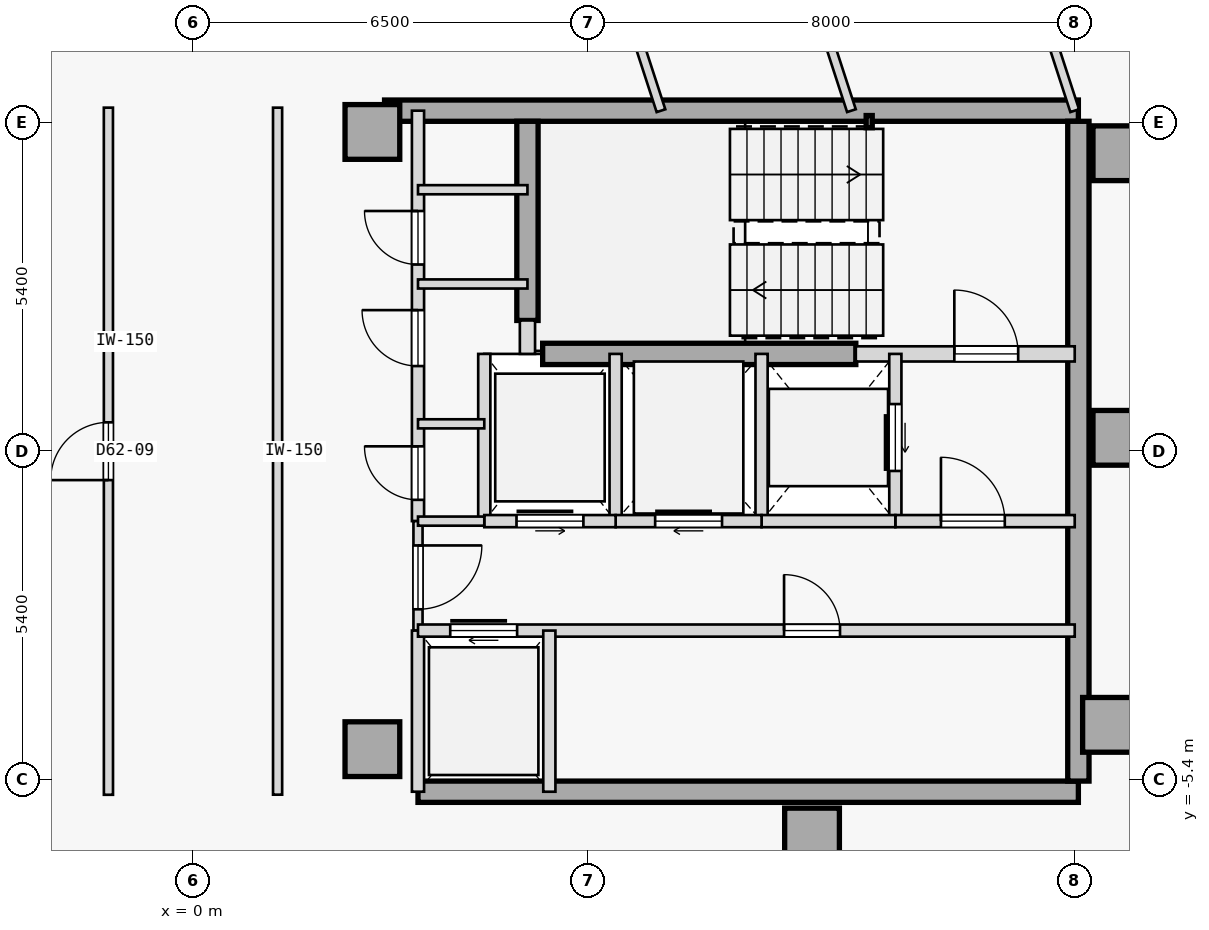
"""IFC4 building model, lengths in metres.
Left out: names, types, materials, properties, quantities, classifications, styles, units other than length and angle.
Written with IfcOpenShell. Run it as: python <this file> out.ifc"""

import sys

from ifc_helpers import new_model, si_unit, direction, frame, frame_2d, origin, origin_2d, place, context, subcontext, project, spatial, rectangle, hollow_rectangle, extrude, element, fill, save


model = new_model("IFC4")
c1 = context("Model", 3, precision=1e-05, world=origin(), true_north=direction((0.0, 1.0)))
c2 = subcontext(c1, "Body", "Model", "MODEL_VIEW")
j1 = project(units=[si_unit("LENGTHUNIT", "METRE"), si_unit("PLANEANGLEUNIT", "RADIAN")], contexts=[c1])
p1 = place(None, origin())
s1 = spatial("IfcSite", under=j1, at=p1, CompositionType="ELEMENT")
p2 = place(p1, origin())
s2 = spatial("IfcBuilding", under=s1, at=p2, CompositionType="ELEMENT")
p3 = place(p2, frame((0.0, 0.0, 234.35)))
s3 = spatial("IfcBuildingStorey", under=s2, at=p3, CompositionType="ELEMENT", Elevation=234.35)
for number, where, z_axis, x_axis in (
    (1, (15.25, 4.9, 0.0), (0.0, 0.0, 1.0), (1.0, 0.0, 0.0)),
    (2, (15.25, 0.22, 0.0), (0.0, 0.0, 1.0), (1.0, 0.0, 0.0)),
    (3, (15.08, -4.5, 0.0), (0.0, 0.0, 1.0), (1.0, 0.0, 0.0)),
    (4, (10.18, -6.32, 0.0), (0.0, 0.0, 1.0), (1.0, 0.0, 0.0)),
    (5, (2.95, -4.9, 0.0), (0.0, 0.0, 1.0), (1.0, 0.0, 0.0)),
    (6, (2.95, 5.25, 0.0), (0.0, 0.0, 1.0), (1.0, 0.0, 0.0)),
):
    element("IfcColumn", number, at=place(p3, frame(where, z_axis=z_axis, x_axis=x_axis)), inside=s3, PredefinedType="COLUMN", context=c2, shape_type="SweptSolid", body=[
        extrude(rectangle(XDim=0.9, YDim=0.9, at=origin_2d()), origin(), (0.0, 0.0, 1.0), 3.35),
    ])
p4 = place(p3, frame((3.15, 5.6, 0.0), z_axis=(0.0, 0.0, 1.0), x_axis=(1.0, 0.0, 0.0)))
e7 = element("IfcWall", 7, at=p4, inside=s3, PredefinedType="SHEAR", context=c2, shape_type="SweptSolid", body=[
    extrude(rectangle(XDim=11.41, YDim=0.35, at=frame_2d((5.705, 0.0))), origin(), (0.0, 0.0, 1.0), 3.125),
])
p5 = place(p3, frame((3.7, -5.6, 0.0), z_axis=(0.0, 0.0, 1.0), x_axis=(1.0, 0.0, 0.0)))
e8 = element("IfcWall", 8, at=p5, inside=s3, PredefinedType="SHEAR", context=c2, shape_type="SweptSolid", body=[
    extrude(rectangle(XDim=10.86, YDim=0.35, at=frame_2d((5.43, 0.0))), origin(), (0.0, 0.0, 1.0), 3.125),
])
p6 = place(p3, frame((14.56, -5.425, 0.0), z_axis=(0.0, 0.0, 1.0), x_axis=(0.0, 1.0, 0.0)))
e9 = element("IfcWall", 9, at=p6, inside=s3, PredefinedType="SHEAR", context=c2, shape_type="SweptSolid", body=[
    extrude(rectangle(XDim=10.85, YDim=0.35, at=frame_2d((5.425, 0.0))), origin(), (0.0, 0.0, 1.0), 3.125),
])
p7 = place(p3, frame((5.5, 2.15, 0.0), z_axis=(0.0, 0.0, 1.0), x_axis=(0.0, 1.0, 0.0)))
e10 = element("IfcWall", 10, at=p7, inside=s3, PredefinedType="SHEAR", context=c2, shape_type="SweptSolid", body=[
    extrude(rectangle(XDim=3.275, YDim=0.35, at=frame_2d((1.638, 0.0))), origin(), (0.0, 0.0, 1.0), 3.125),
])
p8 = place(p3, frame((5.75, 1.6, 0.0), z_axis=(0.0, 0.0, 1.0), x_axis=(1.0, 0.0, 0.0)))
e11 = element("IfcWall", 11, at=p8, inside=s3, PredefinedType="SHEAR", context=c2, shape_type="SweptSolid", body=[
    extrude(rectangle(XDim=5.15, YDim=0.35, at=frame_2d((2.575, 0.0))), origin(), (0.0, 0.0, 1.0), 3.125),
])
p9 = place(p3, frame((11.12, 5.42, 0.0), z_axis=(0.0, 0.0, 1.0), x_axis=(1.0, 0.0, 0.0)))
e12 = element("IfcColumn", 12, at=p9, inside=s3, PredefinedType="COLUMN", context=c2, shape_type="SweptSolid", body=[
    extrude(hollow_rectangle(XDim=0.1, YDim=0.2, WallThickness=0.008, at=origin_2d()), origin(), (0.0, 0.0, 1.0), 3.35),
])
p10 = place(p3, frame((10.9, 1.6, 0.0), z_axis=(0.0, 0.0, 1.0), x_axis=(1.0, 0.0, 0.0)))
e13 = element("IfcWall", 13, at=p10, inside=s3, PredefinedType="STANDARD", context=c2, shape_type="SweptSolid", body=[
    extrude(rectangle(XDim=3.6, YDim=0.25, at=frame_2d((1.8, 0.0))), origin(), (0.0, 0.0, 1.0), 3.125),
])
p11 = place(p10, frame((1.62, 0.0, 0.0)))
e14 = element("IfcOpeningElement", 14, at=p11, cuts=e13, PredefinedType="OPENING", context=c2, shape_type="SweptSolid", body=[
    extrude(rectangle(XDim=1.05, YDim=2.15, at=frame_2d((0.525, 1.075))), frame((0.0, 0.135, 0.0), z_axis=(0.0, -1.0, 0.0), x_axis=(1.0, 0.0, 0.0)), (0.0, 0.0, 1.0), 0.27),
])
p12 = place(p3, frame((5.5, 1.6, 0.0), z_axis=(0.0, 0.0, 1.0), x_axis=(0.0, 1.0, 0.0)))
e15 = element("IfcWall", 15, at=p12, inside=s3, PredefinedType="STANDARD", context=c2, shape_type="SweptSolid", body=[
    extrude(rectangle(XDim=0.55, YDim=0.25, at=frame_2d((0.275, 0.0))), origin(), (0.0, 0.0, 1.0), 3.125),
])
p13 = place(p3, frame((3.7, -1.15, 0.0), z_axis=(0.0, 0.0, 1.0), x_axis=(0.0, 1.0, 0.0)))
e16 = element("IfcWall", 16, at=p13, inside=s3, PredefinedType="STANDARD", context=c2, shape_type="SweptSolid", body=[
    extrude(rectangle(XDim=6.75, YDim=0.2, at=frame_2d((3.375, 0.0))), origin(), (0.0, 0.0, 1.0), 3.125),
])
p14 = place(p13, frame((0.35, 0.0, 0.0)))
e17 = element("IfcOpeningElement", 17, at=p14, cuts=e16, PredefinedType="OPENING", context=c2, shape_type="SweptSolid", body=[
    extrude(rectangle(XDim=0.88, YDim=2.15, at=frame_2d((0.44, 1.075))), frame((0.0, 0.11, 0.0), z_axis=(0.0, -1.0, 0.0), x_axis=(1.0, 0.0, 0.0)), (0.0, 0.0, 1.0), 0.22),
])
p15 = place(p13, frame((2.55, 0.0, 0.0)))
e18 = element("IfcOpeningElement", 18, at=p15, cuts=e16, PredefinedType="OPENING", context=c2, shape_type="SweptSolid", body=[
    extrude(rectangle(XDim=0.92, YDim=2.15, at=frame_2d((0.46, 1.075))), frame((0.0, 0.11, 0.0), z_axis=(0.0, -1.0, 0.0), x_axis=(1.0, 0.0, 0.0)), (0.0, 0.0, 1.0), 0.22),
])
p16 = place(p13, frame((4.22, 0.0, 0.0)))
e19 = element("IfcOpeningElement", 19, at=p16, cuts=e16, PredefinedType="OPENING", context=c2, shape_type="SweptSolid", body=[
    extrude(rectangle(XDim=0.88, YDim=2.15, at=frame_2d((0.44, 1.075))), frame((0.0, 0.11, 0.0), z_axis=(0.0, -1.0, 0.0), x_axis=(1.0, 0.0, 0.0)), (0.0, 0.0, 1.0), 0.22),
])
p17 = place(p3, frame((3.7, -2.95, 0.0), z_axis=(0.0, 0.0, 1.0), x_axis=(0.0, 1.0, 0.0)))
e20 = element("IfcWall", 20, at=p17, inside=s3, PredefinedType="PARTITIONING", context=c2, shape_type="SweptSolid", body=[
    extrude(rectangle(XDim=1.8, YDim=0.15, at=frame_2d((0.9, 0.0))), origin(), (0.0, 0.0, 1.0), 3.125),
])
p18 = place(p17, frame((0.35, 0.0, 0.0)))
e21 = element("IfcOpeningElement", 21, at=p18, cuts=e20, PredefinedType="OPENING", context=c2, shape_type="SweptSolid", body=[
    extrude(rectangle(XDim=1.05, YDim=2.18, at=frame_2d((0.525, 1.09))), frame((0.0, 0.085, 0.0), z_axis=(0.0, -1.0, 0.0), x_axis=(1.0, 0.0, 0.0)), (0.0, 0.0, 1.0), 0.17),
])
p19 = place(p3, frame((3.7, -5.6, 0.0), z_axis=(0.0, 0.0, 1.0), x_axis=(0.0, 1.0, 0.0)))
e22 = element("IfcWall", 22, at=p19, inside=s3, PredefinedType="STANDARD", context=c2, shape_type="SweptSolid", body=[
    extrude(rectangle(XDim=2.65, YDim=0.2, at=frame_2d((1.325, 0.0))), origin(), (0.0, 0.0, 1.0), 3.125),
])
p20 = place(p3, frame((11.55, -1.15, 0.0), z_axis=(0.0, 0.0, 1.0), x_axis=(0.0, 1.0, 0.0)))
e23 = element("IfcWall", 23, at=p20, inside=s3, PredefinedType="STANDARD", context=c2, shape_type="SweptSolid", body=[
    extrude(rectangle(XDim=2.75, YDim=0.2, at=frame_2d((1.375, 0.0))), origin(), (0.0, 0.0, 1.0), 3.125),
])
p21 = place(p20, frame((0.825, 0.0, 0.0)))
e24 = element("IfcOpeningElement", 24, at=p21, cuts=e23, PredefinedType="OPENING", context=c2, shape_type="SweptSolid", body=[
    extrude(rectangle(XDim=1.1, YDim=2.15, at=frame_2d((0.55, 1.075))), frame((0.0, 0.11, 0.0), z_axis=(0.0, -1.0, 0.0), x_axis=(1.0, 0.0, 0.0)), (0.0, 0.0, 1.0), 0.22),
])
p22 = place(p3, frame((9.35, -1.15, 0.0), z_axis=(0.0, 0.0, 1.0), x_axis=(0.0, 1.0, 0.0)))
e25 = element("IfcWall", 25, at=p22, inside=s3, PredefinedType="STANDARD", context=c2, shape_type="SweptSolid", body=[
    extrude(rectangle(XDim=2.75, YDim=0.2, at=frame_2d((1.375, 0.0))), origin(), (0.0, 0.0, 1.0), 3.125),
])
p23 = place(p3, frame((11.55, -1.15, 0.0), z_axis=(0.0, 0.0, 1.0), x_axis=(1.0, 0.0, 0.0)))
e26 = element("IfcWall", 26, at=p23, inside=s3, PredefinedType="STANDARD", context=c2, shape_type="SweptSolid", body=[
    extrude(rectangle(XDim=2.95, YDim=0.2, at=frame_2d((1.475, 0.0))), origin(), (0.0, 0.0, 1.0), 3.125),
])
p24 = place(p23, frame((0.75, 0.0, 0.0)))
e27 = element("IfcOpeningElement", 27, at=p24, cuts=e26, PredefinedType="OPENING", context=c2, shape_type="SweptSolid", body=[
    extrude(rectangle(XDim=1.05, YDim=2.18, at=frame_2d((0.525, 1.09))), frame((0.0, 0.11, 0.0), z_axis=(0.0, -1.0, 0.0), x_axis=(1.0, 0.0, 0.0)), (0.0, 0.0, 1.0), 0.22),
])
p25 = place(p3, frame((9.35, -1.15, 0.0), z_axis=(0.0, 0.0, 1.0), x_axis=(1.0, 0.0, 0.0)))
e28 = element("IfcWall", 28, at=p25, inside=s3, PredefinedType="STANDARD", context=c2, shape_type="SweptSolid", body=[
    extrude(rectangle(XDim=2.2, YDim=0.2, at=frame_2d((1.1, 0.0))), origin(), (0.0, 0.0, 1.0), 3.125),
])
p26 = place(p3, frame((6.95, -1.15, 0.0), z_axis=(0.0, 0.0, 1.0), x_axis=(0.0, 1.0, 0.0)))
e29 = element("IfcWall", 29, at=p26, inside=s3, PredefinedType="STANDARD", context=c2, shape_type="SweptSolid", body=[
    extrude(rectangle(XDim=2.75, YDim=0.2, at=frame_2d((1.375, 0.0))), origin(), (0.0, 0.0, 1.0), 3.125),
])
p27 = place(p3, frame((6.95, -1.15, 0.0), z_axis=(0.0, 0.0, 1.0), x_axis=(1.0, 0.0, 0.0)))
e30 = element("IfcWall", 30, at=p27, inside=s3, PredefinedType="STANDARD", context=c2, shape_type="SweptSolid", body=[
    extrude(rectangle(XDim=2.4, YDim=0.2, at=frame_2d((1.2, 0.0))), origin(), (0.0, 0.0, 1.0), 3.125),
])
p28 = place(p27, frame((0.65, 0.0, 0.0)))
e31 = element("IfcOpeningElement", 31, at=p28, cuts=e30, PredefinedType="OPENING", context=c2, shape_type="SweptSolid", body=[
    extrude(rectangle(XDim=1.1, YDim=2.15, at=frame_2d((0.55, 1.075))), frame((0.0, 0.11, 0.0), z_axis=(0.0, -1.0, 0.0), x_axis=(1.0, 0.0, 0.0)), (0.0, 0.0, 1.0), 0.22),
])
p29 = place(p3, frame((4.79, -1.15, 0.0), z_axis=(0.0, 0.0, 1.0), x_axis=(0.0, 1.0, 0.0)))
e32 = element("IfcWall", 32, at=p29, inside=s3, PredefinedType="STANDARD", context=c2, shape_type="SweptSolid", body=[
    extrude(rectangle(XDim=2.75, YDim=0.2, at=frame_2d((1.375, 0.0))), origin(), (0.0, 0.0, 1.0), 3.125),
])
p30 = place(p3, frame((4.79, -1.15, 0.0), z_axis=(0.0, 0.0, 1.0), x_axis=(1.0, 0.0, 0.0)))
e33 = element("IfcWall", 33, at=p30, inside=s3, PredefinedType="STANDARD", context=c2, shape_type="SweptSolid", body=[
    extrude(rectangle(XDim=2.16, YDim=0.2, at=frame_2d((1.08, 0.0))), origin(), (0.0, 0.0, 1.0), 3.125),
])
p31 = place(p30, frame((0.53, 0.0, 0.0)))
e34 = element("IfcOpeningElement", 34, at=p31, cuts=e33, PredefinedType="OPENING", context=c2, shape_type="SweptSolid", body=[
    extrude(rectangle(XDim=1.1, YDim=2.15, at=frame_2d((0.55, 1.075))), frame((0.0, 0.11, 0.0), z_axis=(0.0, -1.0, 0.0), x_axis=(1.0, 0.0, 0.0)), (0.0, 0.0, 1.0), 0.22),
])
p32 = place(p3, frame((3.7, -1.15, 0.0), z_axis=(0.0, 0.0, 1.0), x_axis=(1.0, 0.0, 0.0)))
e35 = element("IfcWall", 35, at=p32, inside=s3, PredefinedType="PARTITIONING", context=c2, shape_type="SweptSolid", body=[
    extrude(rectangle(XDim=1.09, YDim=0.15, at=frame_2d((0.545, 0.0))), origin(), (0.0, 0.0, 1.0), 3.125),
])
p33 = place(p3, frame((3.7, -2.95, 0.0), z_axis=(0.0, 0.0, 1.0), x_axis=(1.0, 0.0, 0.0)))
e36 = element("IfcWall", 36, at=p33, inside=s3, PredefinedType="STANDARD", context=c2, shape_type="SweptSolid", body=[
    extrude(rectangle(XDim=10.8, YDim=0.2, at=frame_2d((5.4, 0.0))), origin(), (0.0, 0.0, 1.0), 3.125),
])
p34 = place(p33, frame((0.53, 0.0, 0.0)))
e37 = element("IfcOpeningElement", 37, at=p34, cuts=e36, PredefinedType="OPENING", context=c2, shape_type="SweptSolid", body=[
    extrude(rectangle(XDim=1.1, YDim=2.15, at=frame_2d((0.55, 1.075))), frame((0.0, 0.11, 0.0), z_axis=(0.0, -1.0, 0.0), x_axis=(1.0, 0.0, 0.0)), (0.0, 0.0, 1.0), 0.22),
])
p35 = place(p33, frame((6.02, 0.0, 0.0)))
e38 = element("IfcOpeningElement", 38, at=p35, cuts=e36, PredefinedType="OPENING", context=c2, shape_type="SweptSolid", body=[
    extrude(rectangle(XDim=0.92, YDim=2.15, at=frame_2d((0.46, 1.075))), frame((0.0, 0.11, 0.0), z_axis=(0.0, -1.0, 0.0), x_axis=(1.0, 0.0, 0.0)), (0.0, 0.0, 1.0), 0.22),
])
p36 = place(p3, frame((5.86, -5.6, 0.0), z_axis=(0.0, 0.0, 1.0), x_axis=(0.0, 1.0, 0.0)))
e39 = element("IfcWall", 39, at=p36, inside=s3, PredefinedType="STANDARD", context=c2, shape_type="SweptSolid", body=[
    extrude(rectangle(XDim=2.65, YDim=0.2, at=frame_2d((1.325, 0.0))), origin(), (0.0, 0.0, 1.0), 3.125),
])
p37 = place(p3, frame((3.7, 4.3, 0.0), z_axis=(0.0, 0.0, 1.0), x_axis=(1.0, 0.0, 0.0)))
e40 = element("IfcWall", 40, at=p37, inside=s3, PredefinedType="PARTITIONING", context=c2, shape_type="SweptSolid", body=[
    extrude(rectangle(XDim=1.8, YDim=0.15, at=frame_2d((0.9, 0.0))), origin(), (0.0, 0.0, 1.0), 3.125),
])
p38 = place(p3, frame((3.7, 0.45, 0.0), z_axis=(0.0, 0.0, 1.0), x_axis=(1.0, 0.0, 0.0)))
e41 = element("IfcWall", 41, at=p38, inside=s3, PredefinedType="PARTITIONING", context=c2, shape_type="SweptSolid", body=[
    extrude(rectangle(XDim=1.09, YDim=0.15, at=frame_2d((0.545, 0.0))), origin(), (0.0, 0.0, 1.0), 3.125),
])
p39 = place(p3, frame((3.7, 2.75, 0.0), z_axis=(0.0, 0.0, 1.0), x_axis=(1.0, 0.0, 0.0)))
e42 = element("IfcWall", 42, at=p39, inside=s3, PredefinedType="PARTITIONING", context=c2, shape_type="SweptSolid", body=[
    extrude(rectangle(XDim=1.8, YDim=0.15, at=frame_2d((0.9, 0.0))), origin(), (0.0, 0.0, 1.0), 3.125),
])
p40 = place(p3, frame((-1.391, -5.65, 0.0), z_axis=(0.0, 0.0, 1.0), x_axis=(-8.6422954e-05, 0.999999996266, 0.0)))
e43 = element("IfcWall", 43, at=p40, inside=s3, PredefinedType="PARTITIONING", context=c2, shape_type="SweptSolid", body=[
    extrude(rectangle(XDim=11.3, YDim=0.15, at=frame_2d((5.65, 0.0))), origin(), (0.0, 0.0, 1.0), 3.125),
])
p41 = place(p40, frame((5.175, 0.0, 0.0)))
e44 = element("IfcOpeningElement", 44, at=p41, cuts=e43, PredefinedType="OPENING", context=c2, shape_type="SweptSolid", body=[
    extrude(rectangle(XDim=0.95, YDim=2.15, at=frame_2d((0.475, 1.075))), frame((0.0, 0.085, 0.0), z_axis=(0.0, -1.0, 0.0), x_axis=(1.0, 0.0, 0.0)), (0.0, 0.0, 1.0), 0.17),
])
p42 = place(p3, frame((1.391, -5.648, 0.0), z_axis=(0.0, 0.0, 1.0), x_axis=(-4.3218947e-05, 0.999999999066, 0.0)))
e45 = element("IfcWall", 45, at=p42, inside=s3, PredefinedType="PARTITIONING", context=c2, shape_type="SweptSolid", body=[
    extrude(rectangle(XDim=11.298, YDim=0.15, at=frame_2d((5.649, 0.0))), origin(), (0.0, 0.0, 1.0), 3.125),
])
p43 = place(p3, frame((7.696, 5.599, 0.0), z_axis=(0.0, 0.0, 1.0), x_axis=(-0.309022497646, 0.951054728157, 0.0)))
e46 = element("IfcWall", 46, at=p43, inside=s3, PredefinedType="PARTITIONING", context=c2, shape_type="SweptSolid", body=[
    extrude(rectangle(XDim=6.86, YDim=0.15, at=frame_2d((3.43, 0.0))), origin(), (0.0, 0.0, 1.0), 3.125),
])
p44 = place(p3, frame((10.828, 5.6, 0.0), z_axis=(0.0, 0.0, 1.0), x_axis=(-0.30901342663, 0.951057675519, 0.0)))
e47 = element("IfcWall", 47, at=p44, inside=s3, PredefinedType="PARTITIONING", context=c2, shape_type="SweptSolid", body=[
    extrude(rectangle(XDim=7.827, YDim=0.15, at=frame_2d((3.914, 0.0))), origin(), (0.0, 0.0, 1.0), 3.125),
])
p45 = place(p3, frame((14.5, 5.6, 0.0), z_axis=(0.0, 0.0, 1.0), x_axis=(-0.308872364299, 0.951103497298, 0.0)))
e48 = element("IfcWall", 48, at=p45, inside=s3, PredefinedType="PARTITIONING", context=c2, shape_type="SweptSolid", body=[
    extrude(rectangle(XDim=1.705, YDim=0.15, at=frame_2d((0.853, 0.0))), origin(), (0.0, 0.0, 1.0), 3.125),
])
p46 = place(p11, origin())
e49 = element("IfcDoor", 49, at=p46, inside=s3, OperationType="SINGLE_SWING_LEFT", PredefinedType="DOOR", context=c2, shape_type="SweptSolid", body=[
    extrude(rectangle(XDim=1.05, YDim=2.15, at=frame_2d((0.525, 1.075))), frame((0.0, 0.025, 0.0), z_axis=(0.0, -1.0, 0.0), x_axis=(1.0, 0.0, 0.0)), (0.0, 0.0, 1.0), 0.05),
])
fill(e14, e49)
p47 = place(p24, origin())
e50 = element("IfcDoor", 50, at=p47, inside=s3, OperationType="SINGLE_SWING_LEFT", PredefinedType="DOOR", context=c2, shape_type="SweptSolid", body=[
    extrude(rectangle(XDim=1.05, YDim=2.18, at=frame_2d((0.525, 1.09))), frame((0.0, 0.025, 0.0), z_axis=(0.0, -1.0, 0.0), x_axis=(1.0, 0.0, 0.0)), (0.0, 0.0, 1.0), 0.05),
])
fill(e27, e50)
p48 = place(p18, frame((1.05, 0.0, 0.0), z_axis=(0.0, 0.0, 1.0), x_axis=(-1.0, 0.0, 0.0)))
e51 = element("IfcDoor", 51, at=p48, inside=s3, OperationType="SINGLE_SWING_RIGHT", PredefinedType="DOOR", context=c2, shape_type="SweptSolid", body=[
    extrude(rectangle(XDim=1.05, YDim=2.18, at=frame_2d((0.525, 1.09))), frame((0.0, 0.025, 0.0), z_axis=(0.0, -1.0, 0.0), x_axis=(1.0, 0.0, 0.0)), (0.0, 0.0, 1.0), 0.05),
])
fill(e21, e51)
p49 = place(p21, origin())
e52 = element("IfcDoor", 52, at=p49, inside=s3, OperationType="SLIDING_TO_RIGHT", PredefinedType="DOOR", context=c2, shape_type="SweptSolid", body=[
    extrude(rectangle(XDim=1.1, YDim=2.15, at=frame_2d((0.55, 1.075))), frame((0.0, 0.025, 0.0), z_axis=(0.0, -1.0, 0.0), x_axis=(1.0, 0.0, 0.0)), (0.0, 0.0, 1.0), 0.05),
])
fill(e24, e52)
p50 = place(p28, origin())
e53 = element("IfcDoor", 53, at=p50, inside=s3, OperationType="SLIDING_TO_RIGHT", PredefinedType="DOOR", context=c2, shape_type="SweptSolid", body=[
    extrude(rectangle(XDim=1.1, YDim=2.15, at=frame_2d((0.55, 1.075))), frame((0.0, 0.025, 0.0), z_axis=(0.0, -1.0, 0.0), x_axis=(1.0, 0.0, 0.0)), (0.0, 0.0, 1.0), 0.05),
])
fill(e31, e53)
p51 = place(p31, origin())
e54 = element("IfcDoor", 54, at=p51, inside=s3, OperationType="SLIDING_TO_LEFT", PredefinedType="DOOR", context=c2, shape_type="SweptSolid", body=[
    extrude(rectangle(XDim=1.1, YDim=2.15, at=frame_2d((0.55, 1.075))), frame((0.0, 0.025, 0.0), z_axis=(0.0, -1.0, 0.0), x_axis=(1.0, 0.0, 0.0)), (0.0, 0.0, 1.0), 0.05),
])
fill(e34, e54)
p52 = place(p34, origin())
e55 = element("IfcDoor", 55, at=p52, inside=s3, OperationType="SLIDING_TO_RIGHT", PredefinedType="DOOR", context=c2, shape_type="SweptSolid", body=[
    extrude(rectangle(XDim=1.1, YDim=2.15, at=frame_2d((0.55, 1.075))), frame((0.0, 0.025, 0.0), z_axis=(0.0, -1.0, 0.0), x_axis=(1.0, 0.0, 0.0)), (0.0, 0.0, 1.0), 0.05),
])
fill(e37, e55)
p53 = place(p35, origin())
e56 = element("IfcDoor", 56, at=p53, inside=s3, OperationType="SINGLE_SWING_LEFT", PredefinedType="DOOR", context=c2, shape_type="SweptSolid", body=[
    extrude(rectangle(XDim=0.92, YDim=2.15, at=frame_2d((0.46, 1.075))), frame((0.0, 0.025, 0.0), z_axis=(0.0, -1.0, 0.0), x_axis=(1.0, 0.0, 0.0)), (0.0, 0.0, 1.0), 0.05),
])
fill(e38, e56)
p54 = place(p14, origin())
e57 = element("IfcDoor", 57, at=p54, inside=s3, OperationType="SINGLE_SWING_RIGHT", PredefinedType="DOOR", context=c2, shape_type="SweptSolid", body=[
    extrude(rectangle(XDim=0.88, YDim=2.15, at=frame_2d((0.44, 1.075))), frame((0.0, 0.025, 0.0), z_axis=(0.0, -1.0, 0.0), x_axis=(1.0, 0.0, 0.0)), (0.0, 0.0, 1.0), 0.05),
])
fill(e17, e57)
p55 = place(p15, origin())
e58 = element("IfcDoor", 58, at=p55, inside=s3, OperationType="SINGLE_SWING_RIGHT", PredefinedType="DOOR", context=c2, shape_type="SweptSolid", body=[
    extrude(rectangle(XDim=0.92, YDim=2.15, at=frame_2d((0.46, 1.075))), frame((0.0, 0.025, 0.0), z_axis=(0.0, -1.0, 0.0), x_axis=(1.0, 0.0, 0.0)), (0.0, 0.0, 1.0), 0.05),
])
fill(e18, e58)
p56 = place(p16, origin())
e59 = element("IfcDoor", 59, at=p56, inside=s3, OperationType="SINGLE_SWING_RIGHT", PredefinedType="DOOR", context=c2, shape_type="SweptSolid", body=[
    extrude(rectangle(XDim=0.88, YDim=2.15, at=frame_2d((0.44, 1.075))), frame((0.0, 0.025, 0.0), z_axis=(0.0, -1.0, 0.0), x_axis=(1.0, 0.0, 0.0)), (0.0, 0.0, 1.0), 0.05),
])
fill(e19, e59)
p57 = place(p41, origin())
e60 = element("IfcDoor", 60, at=p57, inside=s3, OperationType="SINGLE_SWING_LEFT", PredefinedType="DOOR", context=c2, shape_type="SweptSolid", body=[
    extrude(rectangle(XDim=0.95, YDim=2.15, at=frame_2d((0.475, 1.075))), frame((0.0, 0.025, 0.0), z_axis=(0.0, -1.0, 0.0), x_axis=(1.0, 0.0, 0.0)), (0.0, 0.0, 1.0), 0.05),
])
fill(e44, e60)
save(model, sys.argv[1])
